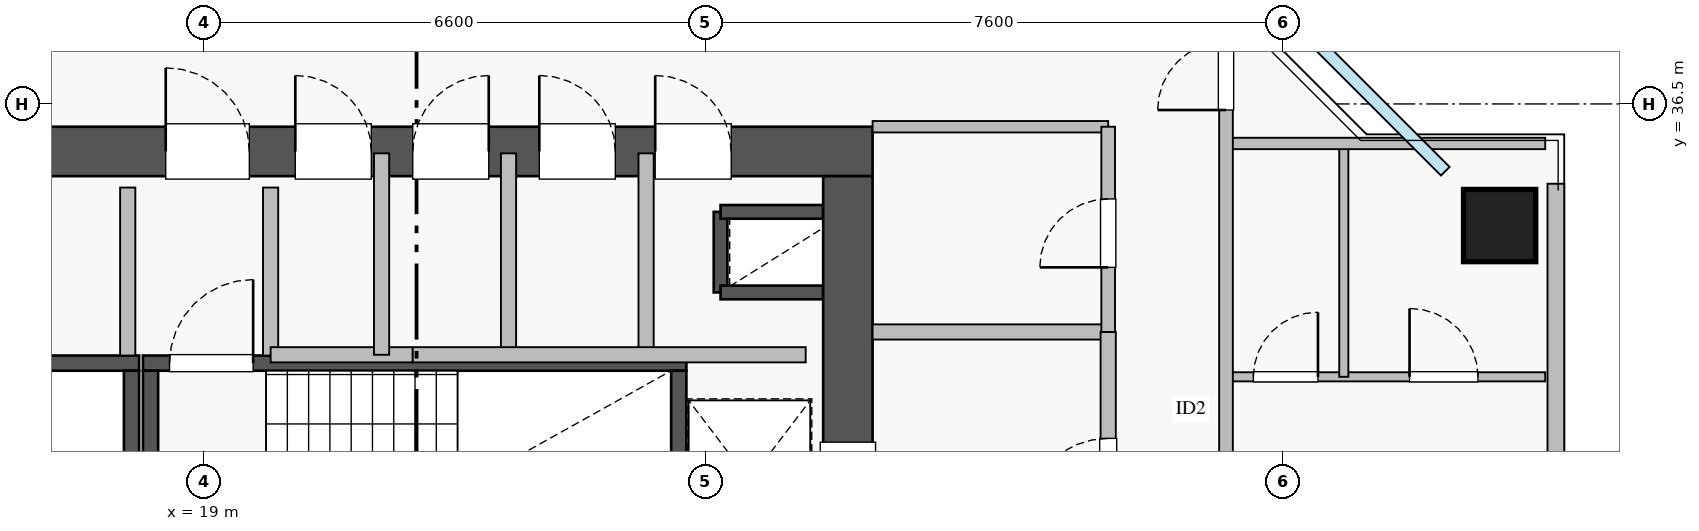
"""IFC4 building model, lengths in metres.
Left out: names, types, materials, properties, quantities, classifications, styles, units other than length and angle.
Written with IfcOpenShell. Run it as: python <this file> out.ifc"""

import sys

from ifc_helpers import new_model, si_unit, direction, frame, frame_2d, origin, origin_2d, place, context, subcontext, project, spatial, rectangle, extrude, source, transform, mapped, element, fill, save


model = new_model("IFC4")
c1 = context("Model", 3, precision=1e-05, world=origin(), true_north=direction((0.0, 1.0)))
c2 = subcontext(c1, "Body", "Model", "MODEL_VIEW")
j1 = project(units=[si_unit("LENGTHUNIT", "METRE"), si_unit("PLANEANGLEUNIT", "RADIAN")], contexts=[c1])
p1 = place(None, origin())
s1 = spatial("IfcSite", under=j1, at=p1, CompositionType="ELEMENT")
p2 = place(p1, origin())
s2 = spatial("IfcBuilding", under=s1, at=p2, CompositionType="ELEMENT")
p3 = place(p2, frame((0.0, 0.0, 153.5)))
s3 = spatial("IfcBuildingStorey", under=s2, at=p3, CompositionType="ELEMENT", Elevation=153.5)
p4 = place(p3, frame((25.8, 34.02, 0.0), z_axis=(0.0, 0.0, 1.0), x_axis=(0.0, 1.0, 0.0)))
e1 = element("IfcWall", 1, at=p4, inside=s3, PredefinedType="SHEAR", context=c2, shape_type="SweptSolid", body=[
    extrude(rectangle(XDim=1.06, YDim=0.18, at=frame_2d((0.53, 0.0))), origin(), (0.0, 0.0, 1.0), 3.07),
])
for number, where, z_axis, x_axis in (
    (2, (25.8, 35.08, 0.0), (0.0, 0.0, 1.0), (1.0, 0.0, 0.0)),
    (3, (25.8, 34.02, 0.0), (0.0, 0.0, 1.0), (1.0, 0.0, 0.0)),
):
    element("IfcWall", number, at=place(p3, frame(where, z_axis=z_axis, x_axis=x_axis)), inside=s3, PredefinedType="SHEAR", context=c2, shape_type="SweptSolid", body=[
        extrude(rectangle(XDim=1.35, YDim=0.18, at=frame_2d((0.675, 0.0))), origin(), (0.0, 0.0, 1.0), 3.07),
    ])
p5 = place(p3, frame((10.85, 33.09, 0.0), z_axis=(0.0, 0.0, 1.0), x_axis=(1.0, 0.0, 0.0)))
e4 = element("IfcWall", 4, at=p5, inside=s3, PredefinedType="SHEAR", context=c2, shape_type="SweptSolid", body=[
    extrude(rectangle(XDim=7.3, YDim=0.2, at=frame_2d((3.65, 0.0))), origin(), (0.0, 0.0, 1.0), 3.25),
])
p6 = place(p5, frame((0.35, 0.0, 0.0)))
e5 = element("IfcOpeningElement", 5, at=p6, cuts=e4, PredefinedType="OPENING", context=c2, shape_type="SweptSolid", body=[
    extrude(rectangle(XDim=1.1, YDim=2.05, at=frame_2d((0.55, 1.025))), frame((0.0, 0.11, 0.0), z_axis=(0.0, -1.0, 0.0), x_axis=(1.0, 0.0, 0.0)), (0.0, 0.0, 1.0), 0.22),
])
p7 = place(p3, frame((18.05, 30.05, 0.0), z_axis=(0.0, 0.0, 1.0), x_axis=(0.0, 1.0, 0.0)))
e6 = element("IfcWall", 6, at=p7, inside=s3, PredefinedType="SHEAR", context=c2, shape_type="SweptSolid", body=[
    extrude(rectangle(XDim=2.94, YDim=0.2, at=frame_2d((1.47, 0.0))), origin(), (0.0, 0.0, 1.0), 3.25),
])
p8 = place(p3, frame((18.2, 33.09, 0.0), z_axis=(0.0, 0.0, 1.0), x_axis=(1.0, 0.0, 0.0)))
e7 = element("IfcWall", 7, at=p8, inside=s3, PredefinedType="SHEAR", context=c2, shape_type="SweptSolid", body=[
    extrude(rectangle(XDim=7.15, YDim=0.2, at=frame_2d((3.575, 0.0))), origin(), (0.0, 0.0, 1.0), 3.25),
])
p9 = place(p8, frame((0.35, 0.0, 0.0)))
e8 = element("IfcOpeningElement", 8, at=p9, cuts=e7, PredefinedType="OPENING", context=c2, shape_type="SweptSolid", body=[
    extrude(rectangle(XDim=1.1, YDim=2.05, at=frame_2d((0.55, 1.025))), frame((0.0, 0.11, 0.0), z_axis=(0.0, -1.0, 0.0), x_axis=(1.0, 0.0, 0.0)), (0.0, 0.0, 1.0), 0.22),
])
for number, where, z_axis, x_axis in (
    (9, (18.3, 30.05, 0.0), (0.0, 0.0, 1.0), (0.0, 1.0, 0.0)),
    (10, (25.25, 30.05, 0.0), (0.0, 0.0, 1.0), (0.0, 1.0, 0.0)),
):
    element("IfcWall", number, at=place(p3, frame(where, z_axis=z_axis, x_axis=x_axis)), inside=s3, PredefinedType="SHEAR", context=c2, shape_type="SweptSolid", body=[
        extrude(rectangle(XDim=2.94, YDim=0.2, at=frame_2d((1.47, 0.0))), origin(), (0.0, 0.0, 1.0), 3.25),
    ])
p10 = place(p3, frame((10.2, 35.875, 0.0), z_axis=(0.0, 0.0, 1.0), x_axis=(1.0, 0.0, 0.0)))
e11 = element("IfcWall", 11, at=p10, inside=s3, PredefinedType="SHEAR", context=c2, shape_type="SweptSolid", body=[
    extrude(rectangle(XDim=17.6, YDim=0.65, at=frame_2d((8.8, 0.0))), origin(), (0.0, 0.0, 1.0), 3.25),
])
p11 = place(p10, frame((1.15, 0.0, 0.0)))
e12 = element("IfcOpeningElement", 12, at=p11, cuts=e11, PredefinedType="OPENING", context=c2, shape_type="SweptSolid", body=[
    extrude(rectangle(XDim=1.1, YDim=2.05, at=frame_2d((0.55, 1.025))), frame((0.0, 0.335, 0.0), z_axis=(0.0, -1.0, 0.0), x_axis=(1.0, 0.0, 0.0)), (0.0, 0.0, 1.0), 0.67),
])
p12 = place(p10, frame((8.3, 0.0, 0.0)))
e13 = element("IfcOpeningElement", 13, at=p12, cuts=e11, PredefinedType="OPENING", context=c2, shape_type="SweptSolid", body=[
    extrude(rectangle(XDim=1.1, YDim=2.05, at=frame_2d((0.55, 1.025))), frame((0.0, 0.335, 0.0), z_axis=(0.0, -1.0, 0.0), x_axis=(1.0, 0.0, 0.0)), (0.0, 0.0, 1.0), 0.67),
])
p13 = place(p10, frame((4.9, 0.0, 0.0)))
e14 = element("IfcOpeningElement", 14, at=p13, cuts=e11, PredefinedType="OPENING", context=c2, shape_type="SweptSolid", body=[
    extrude(rectangle(XDim=1.1, YDim=2.05, at=frame_2d((0.55, 1.025))), frame((0.0, 0.335, 0.0), z_axis=(0.0, -1.0, 0.0), x_axis=(1.0, 0.0, 0.0)), (0.0, 0.0, 1.0), 0.67),
])
p14 = place(p10, frame((14.74, 0.0, 0.0)))
e15 = element("IfcOpeningElement", 15, at=p14, cuts=e11, PredefinedType="OPENING", context=c2, shape_type="SweptSolid", body=[
    extrude(rectangle(XDim=1.0, YDim=2.05, at=frame_2d((0.5, 1.025))), frame((0.0, 0.335, 0.0), z_axis=(0.0, -1.0, 0.0), x_axis=(1.0, 0.0, 0.0)), (0.0, 0.0, 1.0), 0.67),
])
p15 = place(p10, frame((10.005, 0.0, 0.0)))
e16 = element("IfcOpeningElement", 16, at=p15, cuts=e11, PredefinedType="OPENING", context=c2, shape_type="SweptSolid", body=[
    extrude(rectangle(XDim=1.0, YDim=2.05, at=frame_2d((0.5, 1.025))), frame((0.0, 0.335, 0.0), z_axis=(0.0, -1.0, 0.0), x_axis=(1.0, 0.0, 0.0)), (0.0, 0.0, 1.0), 0.67),
])
p16 = place(p10, frame((11.55, 0.0, 0.0)))
e17 = element("IfcOpeningElement", 17, at=p16, cuts=e11, PredefinedType="OPENING", context=c2, shape_type="SweptSolid", body=[
    extrude(rectangle(XDim=1.0, YDim=2.05, at=frame_2d((0.5, 1.025))), frame((0.0, 0.335, 0.0), z_axis=(0.0, -1.0, 0.0), x_axis=(1.0, 0.0, 0.0)), (0.0, 0.0, 1.0), 0.67),
])
p17 = place(p10, frame((13.215, 0.0, 0.0)))
e18 = element("IfcOpeningElement", 18, at=p17, cuts=e11, PredefinedType="OPENING", context=c2, shape_type="SweptSolid", body=[
    extrude(rectangle(XDim=1.0, YDim=2.05, at=frame_2d((0.5, 1.025))), frame((0.0, 0.335, 0.0), z_axis=(0.0, -1.0, 0.0), x_axis=(1.0, 0.0, 0.0)), (0.0, 0.0, 1.0), 0.67),
])
p18 = place(p3, frame((27.475, 29.65, 0.0), z_axis=(0.0, 0.0, 1.0), x_axis=(0.0, 1.0, 0.0)))
e19 = element("IfcWall", 19, at=p18, inside=s3, PredefinedType="SHEAR", context=c2, shape_type="SweptSolid", body=[
    extrude(rectangle(XDim=5.9, YDim=0.65, at=frame_2d((2.95, 0.0))), origin(), (0.0, 0.0, 1.0), 3.25),
])
p19 = place(p18, frame((1.1, 0.0, 0.0)))
e20 = element("IfcOpeningElement", 20, at=p19, cuts=e19, PredefinedType="OPENING", context=c2, shape_type="SweptSolid", body=[
    extrude(rectangle(XDim=1.3, YDim=2.05, at=frame_2d((0.65, 1.025))), frame((0.0, 0.335, 0.0), z_axis=(0.0, -1.0, 0.0), x_axis=(1.0, 0.0, 0.0)), (0.0, 0.0, 1.0), 0.67),
])
m1 = source(origin(), c2, "Body", "SweptSolid", [
    extrude(rectangle(XDim=0.95, YDim=0.95, at=origin_2d()), origin(), (0.0, 0.0, 1.0), 3.25),
])
p20 = place(p3, frame((36.05, 34.9, 0.0), z_axis=(0.0, 0.0, 1.0), x_axis=(1.0, 0.0, 0.0)))
e21 = element("IfcColumn", 21, at=p20, inside=s3, PredefinedType="COLUMN", context=c2, shape_type="MappedRepresentation", body=[
    mapped(m1, transform((0.0, 0.0, 0.0), x_axis=(1.0, 0.0, 0.0), y_axis=(0.0, 1.0, 0.0), z_axis=(0.0, 0.0, 1.0), scale=1.0)),
])
p21 = place(p3, frame((36.79, 29.15, 0.0), z_axis=(0.0, 0.0, 1.0), x_axis=(0.0, 1.0, 0.0)))
e22 = element("IfcWall", 22, at=p21, inside=s3, PredefinedType="STANDARD", context=c2, shape_type="SweptSolid", body=[
    extrude(rectangle(XDim=6.3, YDim=0.22, at=frame_2d((3.15, 0.0))), origin(), (0.0, 0.0, 1.0), 2.61),
])
p22 = place(p3, frame((27.8, 33.5, 0.0), z_axis=(0.0, 0.0, 1.0), x_axis=(1.0, 0.0, 0.0)))
e23 = element("IfcWall", 23, at=p22, inside=s3, PredefinedType="PARTITIONING", context=c2, shape_type="SweptSolid", body=[
    extrude(rectangle(XDim=3.1, YDim=0.2, at=frame_2d((1.55, 0.0))), origin(), (0.0, 0.0, 1.0), 3.07),
])
p23 = place(p3, frame((30.9, 29.6, 0.0), z_axis=(0.0, 0.0, 1.0), x_axis=(0.0, 1.0, 0.0)))
e24 = element("IfcWall", 24, at=p23, inside=s3, PredefinedType="PARTITIONING", context=c2, shape_type="SweptSolid", body=[
    extrude(rectangle(XDim=3.9, YDim=0.2, at=frame_2d((1.95, 0.0))), origin(), (0.0, 0.0, 1.0), 3.07),
])
p24 = place(p23, frame((1.4, 0.0, 0.0)))
e25 = element("IfcOpeningElement", 25, at=p24, cuts=e24, PredefinedType="OPENING", context=c2, shape_type="SweptSolid", body=[
    extrude(rectangle(XDim=1.1, YDim=2.05, at=frame_2d((0.55, 1.025))), frame((0.0, 0.11, 0.0), z_axis=(0.0, -1.0, 0.0), x_axis=(1.0, 0.0, 0.0)), (0.0, 0.0, 1.0), 0.22),
])
for number, where, z_axis, x_axis in (
    (26, (18.0, 33.19, 0.0), (0.0, 0.0, 1.0), (0.0, 1.0, 0.0)),
    (27, (19.88, 33.19, 0.0), (0.0, 0.0, 1.0), (0.0, 1.0, 0.0)),
):
    element("IfcWall", number, at=place(p3, frame(where, z_axis=z_axis, x_axis=x_axis)), inside=s3, PredefinedType="PARTITIONING", context=c2, shape_type="SweptSolid", body=[
        extrude(rectangle(XDim=2.21, YDim=0.2, at=frame_2d((1.105, 0.0))), origin(), (0.0, 0.0, 1.0), 3.07),
    ])
p25 = place(p3, frame((24.82, 33.2, 0.0), z_axis=(0.0, 0.0, 1.0), x_axis=(0.0, 1.0, 0.0)))
e28 = element("IfcWall", 28, at=p25, inside=s3, PredefinedType="PARTITIONING", context=c2, shape_type="SweptSolid", body=[
    extrude(rectangle(XDim=2.65, YDim=0.2, at=frame_2d((1.325, 0.0))), origin(), (0.0, 0.0, 1.0), 3.07),
])
p26 = place(p3, frame((19.88, 33.2, 0.0), z_axis=(0.0, 0.0, 1.0), x_axis=(1.0, 0.0, 0.0)))
e29 = element("IfcWall", 29, at=p26, inside=s3, PredefinedType="PARTITIONING", context=c2, shape_type="SweptSolid", body=[
    extrude(rectangle(XDim=1.87, YDim=0.2, at=frame_2d((0.935, 0.0))), origin(), (0.0, 0.0, 1.0), 3.07),
])
for number, where, z_axis, x_axis in (
    (30, (21.34, 33.2, 0.0), (0.0, 0.0, 1.0), (0.0, 1.0, 0.0)),
    (31, (23.01, 33.2, 0.0), (0.0, 0.0, 1.0), (0.0, 1.0, 0.0)),
):
    element("IfcWall", number, at=place(p3, frame(where, z_axis=z_axis, x_axis=x_axis)), inside=s3, PredefinedType="PARTITIONING", context=c2, shape_type="SweptSolid", body=[
        extrude(rectangle(XDim=2.65, YDim=0.2, at=frame_2d((1.325, 0.0))), origin(), (0.0, 0.0, 1.0), 3.07),
    ])
p27 = place(p3, frame((21.75, 33.2, 0.0), z_axis=(0.0, 0.0, 1.0), x_axis=(1.0, 0.0, 0.0)))
e32 = element("IfcWall", 32, at=p27, inside=s3, PredefinedType="PARTITIONING", context=c2, shape_type="SweptSolid", body=[
    extrude(rectangle(XDim=5.17, YDim=0.2, at=frame_2d((2.585, 0.0))), origin(), (0.0, 0.0, 1.0), 3.07),
])
p28 = place(p3, frame((27.8, 36.2, 0.0), z_axis=(0.0, 0.0, 1.0), x_axis=(1.0, 0.0, 0.0)))
e33 = element("IfcWall", 33, at=p28, inside=s3, PredefinedType="PARTITIONING", context=c2, shape_type="SweptSolid", body=[
    extrude(rectangle(XDim=3.1, YDim=0.15, at=frame_2d((1.55, 0.0))), origin(), (0.0, 0.0, 1.0), 3.07),
])
p29 = place(p3, frame((30.9, 33.5, 0.0), z_axis=(0.0, 0.0, 1.0), x_axis=(0.0, 1.0, 0.0)))
e34 = element("IfcWall", 34, at=p29, inside=s3, PredefinedType="PARTITIONING", context=c2, shape_type="SweptSolid", body=[
    extrude(rectangle(XDim=2.7, YDim=0.18, at=frame_2d((1.35, 0.0))), origin(), (0.0, 0.0, 1.0), 2.577),
])
p30 = place(p29, frame((0.85, 0.0, 0.0)))
e35 = element("IfcOpeningElement", 35, at=p30, cuts=e34, PredefinedType="OPENING", context=c2, shape_type="SweptSolid", body=[
    extrude(rectangle(XDim=0.9, YDim=2.05, at=frame_2d((0.45, 1.025))), frame((0.0, 0.1, 0.0), z_axis=(0.0, -1.0, 0.0), x_axis=(1.0, 0.0, 0.0)), (0.0, 0.0, 1.0), 0.2),
])
p31 = place(p3, frame((32.45, 32.91, 0.0), z_axis=(0.0, 0.0, 1.0), x_axis=(1.0, 0.0, 0.0)))
e36 = element("IfcWall", 36, at=p31, inside=s3, PredefinedType="PLUMBINGWALL", context=c2, shape_type="SweptSolid", body=[
    extrude(rectangle(XDim=4.2, YDim=0.12, at=frame_2d((2.1, 0.0))), origin(), (0.0, 0.0, 1.0), 3.07),
])
p32 = place(p31, frame((0.36, 0.0, 0.0)))
e37 = element("IfcOpeningElement", 37, at=p32, cuts=e36, PredefinedType="OPENING", context=c2, shape_type="SweptSolid", body=[
    extrude(rectangle(XDim=0.85, YDim=2.05, at=frame_2d((0.425, 1.025))), frame((0.0, 0.07, 0.0), z_axis=(0.0, -1.0, 0.0), x_axis=(1.0, 0.0, 0.0)), (0.0, 0.0, 1.0), 0.14),
])
p33 = place(p31, frame((2.415, 0.0, 0.0)))
e38 = element("IfcOpeningElement", 38, at=p33, cuts=e36, PredefinedType="OPENING", context=c2, shape_type="SweptSolid", body=[
    extrude(rectangle(XDim=0.9, YDim=2.05, at=frame_2d((0.45, 1.025))), frame((0.0, 0.07, 0.0), z_axis=(0.0, -1.0, 0.0), x_axis=(1.0, 0.0, 0.0)), (0.0, 0.0, 1.0), 0.14),
])
p34 = place(p3, frame((34.0, 32.91, 0.0), z_axis=(0.0, 0.0, 1.0), x_axis=(0.0, 1.0, 0.0)))
e39 = element("IfcWall", 39, at=p34, inside=s3, PredefinedType="PLUMBINGWALL", context=c2, shape_type="SweptSolid", body=[
    extrude(rectangle(XDim=3.07, YDim=0.12, at=frame_2d((1.535, 0.0))), origin(), (0.0, 0.0, 1.0), 3.07),
])
p35 = place(p3, frame((32.45, 35.98, 0.0), z_axis=(0.0, 0.0, 1.0), x_axis=(1.0, 0.0, 0.0)))
e40 = element("IfcWall", 40, at=p35, inside=s3, PredefinedType="PARTITIONING", context=c2, shape_type="SweptSolid", body=[
    extrude(rectangle(XDim=4.2, YDim=0.15, at=frame_2d((2.1, 0.0))), origin(), (0.0, 0.0, 1.0), 3.07),
])
p36 = place(p3, frame((32.45, 29.3, 0.0), z_axis=(0.0, 0.0, 1.0), x_axis=(0.0, 1.0, 0.0)))
e41 = element("IfcWall", 41, at=p36, inside=s3, PredefinedType="PARTITIONING", context=c2, shape_type="SweptSolid", body=[
    extrude(rectangle(XDim=11.35, YDim=0.18, at=frame_2d((5.675, 0.0))), origin(), (0.0, 0.0, 1.0), 3.07),
])
p37 = place(p36, frame((1.115, 0.0, 0.0)))
e42 = element("IfcOpeningElement", 42, at=p37, cuts=e41, PredefinedType="OPENING", context=c2, shape_type="SweptSolid", body=[
    extrude(rectangle(XDim=1.0, YDim=2.05, at=frame_2d((0.5, 1.025))), frame((0.0, 0.1, 0.0), z_axis=(0.0, -1.0, 0.0), x_axis=(1.0, 0.0, 0.0)), (0.0, 0.0, 1.0), 0.2),
])
p38 = place(p36, frame((7.12, 0.0, 0.0)))
e43 = element("IfcOpeningElement", 43, at=p38, cuts=e41, PredefinedType="OPENING", context=c2, shape_type="SweptSolid", body=[
    extrude(rectangle(XDim=0.9, YDim=2.05, at=frame_2d((0.45, 1.025))), frame((0.0, 0.1, 0.0), z_axis=(0.0, -1.0, 0.0), x_axis=(1.0, 0.0, 0.0)), (0.0, 0.0, 1.0), 0.2),
])
m2 = source(origin(), c2, "Body", "SweptSolid", [
    extrude(rectangle(XDim=1.3, YDim=2.05, at=frame_2d((0.65, 1.025))), frame((0.0, 0.025, 0.0), z_axis=(0.0, -1.0, 0.0), x_axis=(1.0, 0.0, 0.0)), (0.0, 0.0, 1.0), 0.05),
])
p39 = place(p19, origin())
e44 = element("IfcDoor", 44, at=p39, inside=s3, OperationType="SLIDING_TO_LEFT", PredefinedType="DOOR", context=c2, shape_type="MappedRepresentation", body=[
    mapped(m2, transform((0.0, 0.0, 0.0), x_axis=(1.0, 0.0, 0.0), y_axis=(0.0, 1.0, 0.0), z_axis=(0.0, 0.0, 1.0), scale=1.0)),
])
fill(e20, e44)
m3 = source(origin(), c2, "Body", "SweptSolid", [
    extrude(rectangle(XDim=1.1, YDim=2.05, at=frame_2d((0.55, 1.025))), frame((0.0, 0.025, 0.0), z_axis=(0.0, -1.0, 0.0), x_axis=(1.0, 0.0, 0.0)), (0.0, 0.0, 1.0), 0.05),
])
p40 = place(p12, origin())
e45 = element("IfcDoor", 45, at=p40, inside=s3, OperationType="SINGLE_SWING_LEFT", PredefinedType="DOOR", context=c2, shape_type="MappedRepresentation", body=[
    mapped(m3, transform((0.0, 0.0, 0.0), x_axis=(1.0, 0.0, 0.0), y_axis=(0.0, 1.0, 0.0), z_axis=(0.0, 0.0, 1.0), scale=1.0)),
])
fill(e13, e45)
p41 = place(p9, origin())
e46 = element("IfcDoor", 46, at=p41, inside=s3, OperationType="SINGLE_SWING_RIGHT", PredefinedType="DOOR", context=c2, shape_type="MappedRepresentation", body=[
    mapped(m3, transform((0.0, 0.0, 0.0), x_axis=(1.0, 0.0, 0.0), y_axis=(0.0, 1.0, 0.0), z_axis=(0.0, 0.0, 1.0), scale=1.0)),
])
fill(e8, e46)
m4 = source(origin(), c2, "Body", "SweptSolid", [
    extrude(rectangle(XDim=1.0, YDim=2.05, at=frame_2d((0.5, 1.025))), frame((0.0, 0.025, 0.0), z_axis=(0.0, -1.0, 0.0), x_axis=(1.0, 0.0, 0.0)), (0.0, 0.0, 1.0), 0.05),
])
p42 = place(p14, origin())
e47 = element("IfcDoor", 47, at=p42, inside=s3, OperationType="SINGLE_SWING_LEFT", PredefinedType="DOOR", context=c2, shape_type="MappedRepresentation", body=[
    mapped(m4, transform((0.0, 0.0, 0.0), x_axis=(1.0, 0.0, 0.0), y_axis=(0.0, 1.0, 0.0), z_axis=(0.0, 0.0, 1.0), scale=1.0)),
])
fill(e15, e47)
p43 = place(p15, origin())
e48 = element("IfcDoor", 48, at=p43, inside=s3, OperationType="SINGLE_SWING_LEFT", PredefinedType="DOOR", context=c2, shape_type="MappedRepresentation", body=[
    mapped(m4, transform((0.0, 0.0, 0.0), x_axis=(1.0, 0.0, 0.0), y_axis=(0.0, 1.0, 0.0), z_axis=(0.0, 0.0, 1.0), scale=1.0)),
])
fill(e16, e48)
p44 = place(p16, origin())
e49 = element("IfcDoor", 49, at=p44, inside=s3, OperationType="SINGLE_SWING_RIGHT", PredefinedType="DOOR", context=c2, shape_type="MappedRepresentation", body=[
    mapped(m4, transform((0.0, 0.0, 0.0), x_axis=(1.0, 0.0, 0.0), y_axis=(0.0, 1.0, 0.0), z_axis=(0.0, 0.0, 1.0), scale=1.0)),
])
fill(e17, e49)
p45 = place(p17, origin())
e50 = element("IfcDoor", 50, at=p45, inside=s3, OperationType="SINGLE_SWING_LEFT", PredefinedType="DOOR", context=c2, shape_type="MappedRepresentation", body=[
    mapped(m4, transform((0.0, 0.0, 0.0), x_axis=(1.0, 0.0, 0.0), y_axis=(0.0, 1.0, 0.0), z_axis=(0.0, 0.0, 1.0), scale=1.0)),
])
fill(e18, e50)
p46 = place(p24, origin())
e51 = element("IfcDoor", 51, at=p46, inside=s3, OperationType="SINGLE_SWING_LEFT", PredefinedType="DOOR", context=c2, shape_type="MappedRepresentation", body=[
    mapped(m3, transform((0.0, 0.0, 0.0), x_axis=(1.0, 0.0, 0.0), y_axis=(0.0, 1.0, 0.0), z_axis=(0.0, 0.0, 1.0), scale=1.0)),
])
fill(e25, e51)
m5 = source(origin(), c2, "Body", "SweptSolid", [
    extrude(rectangle(XDim=0.9, YDim=2.05, at=frame_2d((0.45, 1.025))), frame((0.0, 0.025, 0.0), z_axis=(0.0, -1.0, 0.0), x_axis=(1.0, 0.0, 0.0)), (0.0, 0.0, 1.0), 0.05),
])
p47 = place(p30, origin())
e52 = element("IfcDoor", 52, at=p47, inside=s3, OperationType="SINGLE_SWING_LEFT", PredefinedType="DOOR", context=c2, shape_type="MappedRepresentation", body=[
    mapped(m5, transform((0.0, 0.0, 0.0), x_axis=(1.0, 0.0, 0.0), y_axis=(0.0, 1.0, 0.0), z_axis=(0.0, 0.0, 1.0), scale=1.0)),
])
fill(e35, e52)
m6 = source(origin(), c2, "Body", "SweptSolid", [
    extrude(rectangle(XDim=0.85, YDim=2.05, at=frame_2d((0.425, 1.025))), frame((0.0, 0.025, 0.0), z_axis=(0.0, -1.0, 0.0), x_axis=(1.0, 0.0, 0.0)), (0.0, 0.0, 1.0), 0.05),
])
p48 = place(p32, origin())
e53 = element("IfcDoor", 53, at=p48, inside=s3, OperationType="SINGLE_SWING_RIGHT", PredefinedType="DOOR", context=c2, shape_type="MappedRepresentation", body=[
    mapped(m6, transform((0.0, 0.0, 0.0), x_axis=(1.0, 0.0, 0.0), y_axis=(0.0, 1.0, 0.0), z_axis=(0.0, 0.0, 1.0), scale=1.0)),
])
fill(e37, e53)
p49 = place(p33, origin())
e54 = element("IfcDoor", 54, at=p49, inside=s3, OperationType="SINGLE_SWING_LEFT", PredefinedType="DOOR", context=c2, shape_type="MappedRepresentation", body=[
    mapped(m5, transform((0.0, 0.0, 0.0), x_axis=(1.0, 0.0, 0.0), y_axis=(0.0, 1.0, 0.0), z_axis=(0.0, 0.0, 1.0), scale=1.0)),
])
fill(e38, e54)
p50 = place(p38, origin())
e55 = element("IfcDoor", 55, at=p50, inside=s3, OperationType="SINGLE_SWING_LEFT", PredefinedType="DOOR", context=c2, shape_type="MappedRepresentation", body=[
    mapped(m5, transform((0.0, 0.0, 0.0), x_axis=(1.0, 0.0, 0.0), y_axis=(0.0, 1.0, 0.0), z_axis=(0.0, 0.0, 1.0), scale=1.0)),
])
fill(e43, e55)
save(model, sys.argv[1])
